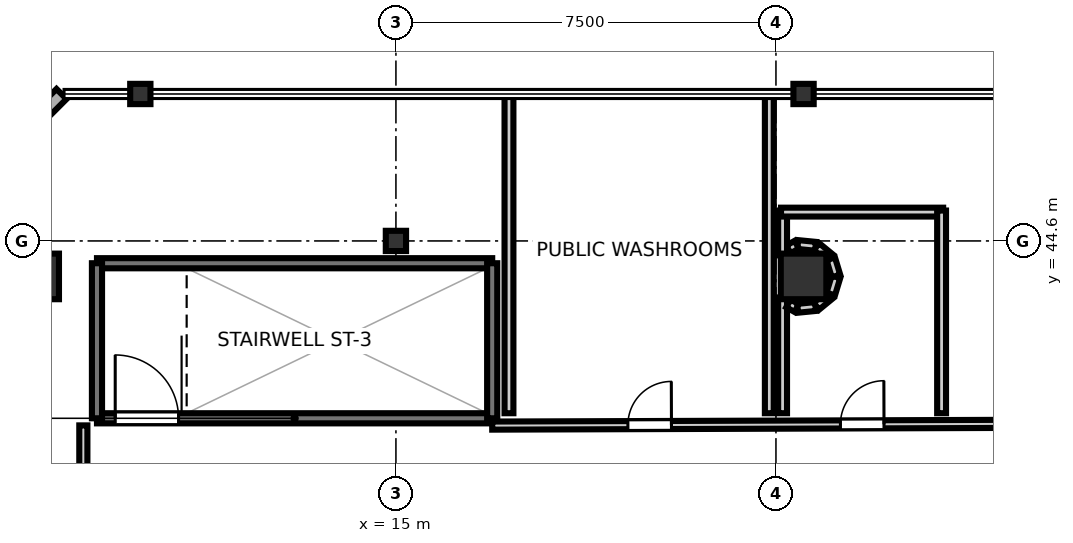
"""IFC4 building model, lengths in metres.
Left out: names, types, materials, properties, quantities, classifications, styles, units other than length and angle.
Written with IfcOpenShell. Run it as: python <this file> out.ifc"""

import sys

from ifc_helpers import new_model, si_unit, direction, frame, frame_2d, origin, origin_2d, place, context, subcontext, project, spatial, rectangle, i_section, extrude, element, fill, save


model = new_model("IFC4")
c1 = context("Model", 3, precision=1e-05, world=origin(), true_north=direction((0.0, 1.0)))
c2 = subcontext(c1, "Body", "Model", "MODEL_VIEW")
j1 = project(units=[si_unit("LENGTHUNIT", "METRE"), si_unit("PLANEANGLEUNIT", "RADIAN")], contexts=[c1])
p1 = place(None, origin())
s1 = spatial("IfcSite", under=j1, at=p1, CompositionType="ELEMENT")
p2 = place(p1, origin())
s2 = spatial("IfcBuilding", under=s1, at=p2, CompositionType="ELEMENT")
p3 = place(p2, frame((0.0, 0.0, 20.6)))
s3 = spatial("IfcBuildingStorey", under=s2, at=p3, CompositionType="ELEMENT", Elevation=20.6)
for number, where, z_axis, x_axis in (
    (1, (7.9, 43.9, 0.0), (0.0, 0.0, 1.0), (1.0, 0.0, 0.0)),
    (2, (23.045, 43.9, 0.0), (0.0, 0.0, 1.0), (1.0, 0.0, 0.0)),
):
    element("IfcColumn", number, at=place(p3, frame(where, z_axis=z_axis, x_axis=x_axis)), inside=s3, PredefinedType="COLUMN", context=c2, shape_type="SweptSolid", body=[
        extrude(rectangle(XDim=0.9, YDim=0.9, at=origin_2d()), origin(), (0.0, 0.0, 1.0), 5.1),
    ])
for number, where, z_axis, x_axis in (
    (3, (15.0, 44.6, 0.0), (0.0, 0.0, 1.0), (1.0, 0.0, 0.0)),
    (4, (9.955, 47.5, 0.0), (0.0, 0.0, 1.0), (1.0, 0.0, 0.0)),
    (5, (23.045, 47.5, 0.0), (0.0, 0.0, 1.0), (1.0, 0.0, 0.0)),
):
    element("IfcColumn", number, at=place(p3, frame(where, z_axis=z_axis, x_axis=x_axis)), inside=s3, PredefinedType="COLUMN", context=c2, shape_type="SweptSolid", body=[
        extrude(i_section(OverallWidth=0.4, OverallDepth=0.4, WebThickness=0.013, FlangeThickness=0.021, at=origin_2d()), origin(), (0.0, 0.0, 1.0), 5.1),
    ])
p4 = place(p3, frame((8.4, 47.5, 0.0), z_axis=(0.0, 0.0, 1.0), x_axis=(-0.707106781187, -0.707106781187, 0.0)))
e6 = element("IfcWall", 6, at=p4, inside=s3, PredefinedType="SOLIDWALL", context=c2, shape_type="SweptSolid", body=[
    extrude(rectangle(XDim=5.94, YDim=0.28, at=frame_2d((2.97, 0.0))), origin(), (0.0, 0.0, 1.0), 4.88),
])
p5 = place(p4, frame((1.77, 0.0, 0.9)))
e7 = element("IfcOpeningElement", 7, at=p5, cuts=e6, PredefinedType="OPENING", context=c2, shape_type="SweptSolid", body=[
    extrude(rectangle(XDim=2.4, YDim=2.6, at=frame_2d((1.2, 1.3))), frame((0.0, 0.15, 0.0), z_axis=(0.0, -1.0, 0.0), x_axis=(1.0, 0.0, 0.0)), (0.0, 0.0, 1.0), 0.3),
])
p6 = place(p3, frame((9.1, 41.1, 0.0), z_axis=(0.0, 0.0, 1.0), x_axis=(1.0, 0.0, 0.0)))
e8 = element("IfcWall", 8, at=p6, inside=s3, PredefinedType="SOLIDWALL", context=c2, shape_type="SweptSolid", body=[
    extrude(rectangle(XDim=7.8, YDim=0.2, at=frame_2d((3.9, 0.0))), origin(), (0.0, 0.0, 1.0), 4.88),
])
p7 = place(p6, frame((0.36, 0.0, 0.0)))
e9 = element("IfcOpeningElement", 9, at=p7, cuts=e8, PredefinedType="OPENING", context=c2, shape_type="SweptSolid", body=[
    extrude(rectangle(XDim=1.25, YDim=2.15, at=frame_2d((0.625, 1.075))), frame((0.0, 0.11, 0.0), z_axis=(0.0, -1.0, 0.0), x_axis=(1.0, 0.0, 0.0)), (0.0, 0.0, 1.0), 0.22),
])
p8 = place(p3, frame((9.1, 44.16, 0.0), z_axis=(0.0, 0.0, 1.0), x_axis=(1.0, 0.0, 0.0)))
e10 = element("IfcWall", 10, at=p8, inside=s3, PredefinedType="SOLIDWALL", context=c2, shape_type="SweptSolid", body=[
    extrude(rectangle(XDim=7.8, YDim=0.2, at=frame_2d((3.9, 0.0))), origin(), (0.0, 0.0, 1.0), 4.88),
])
for number, where, z_axis, x_axis in (
    (11, (9.1, 41.1, 0.0), (0.0, 0.0, 1.0), (0.0, 1.0, 0.0)),
    (12, (16.9, 41.1, 0.0), (0.0, 0.0, 1.0), (0.0, 1.0, 0.0)),
):
    element("IfcWall", number, at=place(p3, frame(where, z_axis=z_axis, x_axis=x_axis)), inside=s3, PredefinedType="SOLIDWALL", context=c2, shape_type="SweptSolid", body=[
        extrude(rectangle(XDim=3.06, YDim=0.2, at=frame_2d((1.53, 0.0))), origin(), (0.0, 0.0, 1.0), 4.88),
    ])
p9 = place(p3, frame((8.831, 37.8, 0.0), z_axis=(0.0, 0.0, 1.0), x_axis=(0.0, 1.0, 0.0)))
e13 = element("IfcWall", 13, at=p9, inside=s3, PredefinedType="PARTITIONING", context=c2, shape_type="SweptSolid", body=[
    extrude(rectangle(XDim=3.16, YDim=0.16, at=frame_2d((1.58, 0.0))), origin(), (0.0, 0.0, 1.0), 3.4),
])
p10 = place(p3, frame((16.9, 40.956, 0.0), z_axis=(0.0, 0.0, 1.0), x_axis=(0.999994432489, 0.003336913407, 0.0)))
e14 = element("IfcWall", 14, at=p10, inside=s3, PredefinedType="PARTITIONING", context=c2, shape_type="SweptSolid", body=[
    extrude(rectangle(XDim=9.95, YDim=0.16, at=frame_2d((4.975, 0.0))), origin(), (0.0, 0.0, 1.0), 3.4),
])
p11 = place(p10, frame((6.873, 0.0, 0.0)))
e15 = element("IfcOpeningElement", 15, at=p11, cuts=e14, PredefinedType="OPENING", context=c2, shape_type="SweptSolid", body=[
    extrude(rectangle(XDim=0.86, YDim=2.05, at=frame_2d((0.43, 1.025))), frame((0.0, 0.09, 0.0), z_axis=(0.0, -1.0, 0.0), x_axis=(1.0, 0.0, 0.0)), (0.0, 0.0, 1.0), 0.18),
])
p12 = place(p10, frame((2.678, 0.0, 0.0)))
e16 = element("IfcOpeningElement", 16, at=p12, cuts=e14, PredefinedType="OPENING", context=c2, shape_type="SweptSolid", body=[
    extrude(rectangle(XDim=0.86, YDim=2.05, at=frame_2d((0.43, 1.025))), frame((0.0, 0.09, 0.0), z_axis=(0.0, -1.0, 0.0), x_axis=(1.0, 0.0, 0.0)), (0.0, 0.0, 1.0), 0.18),
])
p13 = place(p3, frame((22.631, 41.2, 0.0), z_axis=(0.0, 0.0, 1.0), x_axis=(0.0, 1.0, 0.0)))
e17 = element("IfcWall", 17, at=p13, inside=s3, PredefinedType="PLUMBINGWALL", context=c2, shape_type="SweptSolid", body=[
    extrude(rectangle(XDim=2.285, YDim=0.175, at=frame_2d((1.143, 0.0))), origin(), (0.0, 0.0, 1.0), 3.4),
])
p14 = place(p3, frame((22.746, 43.367, 0.0), z_axis=(0.0, 0.0, 1.0), x_axis=(0.871575537125, -0.490261239633, 0.0)))
e18 = element("IfcWall", 18, at=p14, inside=s3, PredefinedType="PLUMBINGWALL", context=c2, shape_type="SweptSolid", body=[
    extrude(rectangle(XDim=0.188, YDim=0.175, at=frame_2d((0.094, 0.0))), origin(), (0.0, 0.0, 1.0), 3.4),
])
p15 = place(p3, frame((22.929, 43.271, 0.0), z_axis=(0.0, 0.0, 1.0), x_axis=(0.995193004206, 0.097933060705, 0.0)))
e19 = element("IfcWall", 19, at=p15, inside=s3, PredefinedType="PLUMBINGWALL", context=c2, shape_type="SweptSolid", body=[
    extrude(rectangle(XDim=0.354, YDim=0.175, at=frame_2d((0.177, 0.0))), origin(), (0.0, 0.0, 1.0), 3.4),
])
for number, where, z_axis, x_axis in (
    (20, (23.298, 43.312, 0.0), (0.0, 0.0, 1.0), (0.773, 0.634, 0.0)),
    (21, (23.582, 43.552, 0.0), (0.0, 0.0, 1.0), (0.29, 0.957, 0.0)),
):
    element("IfcWall", number, at=place(p3, frame(where, z_axis=z_axis, x_axis=x_axis)), inside=s3, PredefinedType="PLUMBINGWALL", context=c2, shape_type="SweptSolid", body=[
        extrude(rectangle(XDim=0.354, YDim=0.175, at=frame_2d((0.177, 0.0))), origin(), (0.0, 0.0, 1.0), 3.4),
    ])
p16 = place(p3, frame((23.684, 43.909, 0.0), z_axis=(0.0, 0.0, 1.0), x_axis=(-0.290256142171, 0.956948991291, 0.0)))
e22 = element("IfcWall", 22, at=p16, inside=s3, PredefinedType="PLUMBINGWALL", context=c2, shape_type="SweptSolid", body=[
    extrude(rectangle(XDim=0.354, YDim=0.175, at=frame_2d((0.177, 0.0))), origin(), (0.0, 0.0, 1.0), 3.4),
])
p17 = place(p3, frame((23.572, 44.263, 0.0), z_axis=(0.0, 0.0, 1.0), x_axis=(-0.773281307259, 0.634063103992, 0.0)))
e23 = element("IfcWall", 23, at=p17, inside=s3, PredefinedType="PLUMBINGWALL", context=c2, shape_type="SweptSolid", body=[
    extrude(rectangle(XDim=0.354, YDim=0.175, at=frame_2d((0.177, 0.0))), origin(), (0.0, 0.0, 1.0), 3.4),
])
p18 = place(p3, frame((23.281, 44.494, 0.0), z_axis=(0.0, 0.0, 1.0), x_axis=(-0.995193004206, 0.097933060705, 0.0)))
e24 = element("IfcWall", 24, at=p18, inside=s3, PredefinedType="PLUMBINGWALL", context=c2, shape_type="SweptSolid", body=[
    extrude(rectangle(XDim=0.354, YDim=0.175, at=frame_2d((0.177, 0.0))), origin(), (0.0, 0.0, 1.0), 3.4),
])
p19 = place(p3, frame((22.91, 44.525, 0.0), z_axis=(0.0, 0.0, 1.0), x_axis=(-0.871575537125, -0.490261239633, 0.0)))
e25 = element("IfcWall", 25, at=p19, inside=s3, PredefinedType="PLUMBINGWALL", context=c2, shape_type="SweptSolid", body=[
    extrude(rectangle(XDim=0.188, YDim=0.175, at=frame_2d((0.094, 0.0))), origin(), (0.0, 0.0, 1.0), 3.4),
])
p20 = place(p3, frame((22.631, 44.315, 0.0), z_axis=(0.0, 0.0, 1.0), x_axis=(0.0, 1.0, 0.0)))
e26 = element("IfcWall", 26, at=p20, inside=s3, PredefinedType="PLUMBINGWALL", context=c2, shape_type="SweptSolid", body=[
    extrude(rectangle(XDim=0.885, YDim=0.175, at=frame_2d((0.442, 0.0))), origin(), (0.0, 0.0, 1.0), 3.4),
])
p21 = place(p3, frame((22.6, 45.169, 0.0), z_axis=(0.0, 0.0, 1.0), x_axis=(1.0, 0.0, 0.0)))
e27 = element("IfcWall", 27, at=p21, inside=s3, PredefinedType="PLUMBINGWALL", context=c2, shape_type="SweptSolid", body=[
    extrude(rectangle(XDim=3.2, YDim=0.175, at=frame_2d((1.6, 0.0))), origin(), (0.0, 0.0, 1.0), 3.4),
])
p22 = place(p3, frame((25.769, 45.2, 0.0), z_axis=(0.0, 0.0, 1.0), x_axis=(0.0, -1.0, 0.0)))
e28 = element("IfcWall", 28, at=p22, inside=s3, PredefinedType="PLUMBINGWALL", context=c2, shape_type="SweptSolid", body=[
    extrude(rectangle(XDim=4.0, YDim=0.175, at=frame_2d((2.0, 0.0))), origin(), (0.0, 0.0, 1.0), 3.4),
])
for number, where, z_axis, x_axis in (
    (29, (22.369, 47.52, 0.0), (0.0, 0.0, 1.0), (0.0, -1.0, 0.0)),
    (30, (17.231, 41.2, 0.0), (0.0, 0.0, 1.0), (0.0, 1.0, 0.0)),
):
    element("IfcWall", number, at=place(p3, frame(where, z_axis=z_axis, x_axis=x_axis)), inside=s3, PredefinedType="PLUMBINGWALL", context=c2, shape_type="SweptSolid", body=[
        extrude(rectangle(XDim=6.32, YDim=0.175, at=frame_2d((3.16, 0.0))), origin(), (0.0, 0.0, 1.0), 3.4),
    ])
p23 = place(p7, origin())
e31 = element("IfcDoor", 31, at=p23, inside=s3, OperationType="SINGLE_SWING_LEFT", PredefinedType="DOOR", context=c2, shape_type="SweptSolid", body=[
    extrude(rectangle(XDim=1.25, YDim=2.15, at=frame_2d((0.625, 1.075))), frame((0.0, 0.025, 0.0), z_axis=(0.0, -1.0, 0.0), x_axis=(1.0, 0.0, 0.0)), (0.0, 0.0, 1.0), 0.05),
])
fill(e9, e31)
p24 = place(p11, origin())
e32 = element("IfcDoor", 32, at=p24, inside=s3, OperationType="SINGLE_SWING_RIGHT", PredefinedType="DOOR", context=c2, shape_type="SweptSolid", body=[
    extrude(rectangle(XDim=0.86, YDim=2.05, at=frame_2d((0.43, 1.025))), frame((0.0, 0.025, 0.0), z_axis=(0.0, -1.0, 0.0), x_axis=(1.0, 0.0, 0.0)), (0.0, 0.0, 1.0), 0.05),
])
fill(e15, e32)
p25 = place(p12, origin())
e33 = element("IfcDoor", 33, at=p25, inside=s3, OperationType="SINGLE_SWING_RIGHT", PredefinedType="DOOR", context=c2, shape_type="SweptSolid", body=[
    extrude(rectangle(XDim=0.86, YDim=2.05, at=frame_2d((0.43, 1.025))), frame((0.0, 0.025, 0.0), z_axis=(0.0, -1.0, 0.0), x_axis=(1.0, 0.0, 0.0)), (0.0, 0.0, 1.0), 0.05),
])
fill(e16, e33)
save(model, sys.argv[1])
